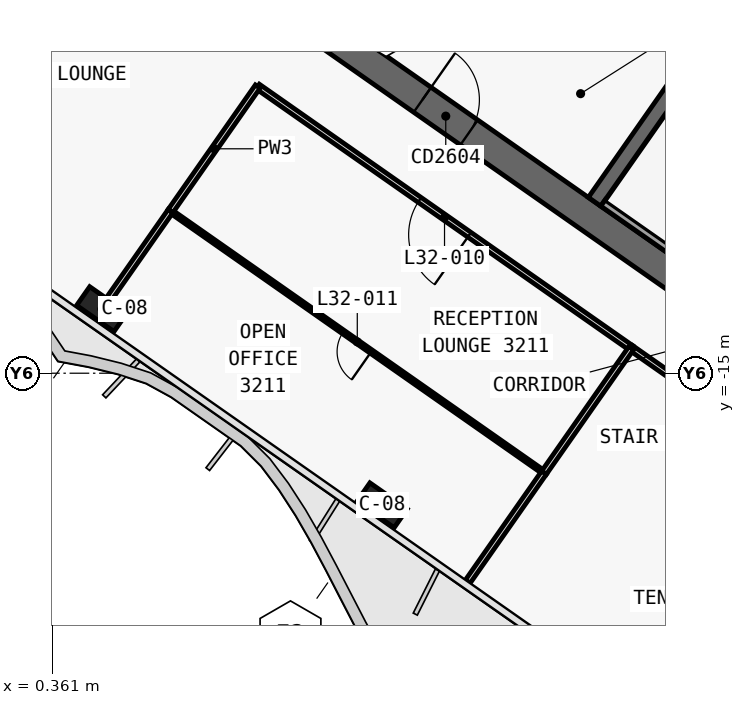
"""IFC4 building model, lengths in metres.
Left out: names, types, materials, properties, quantities, classifications, styles, units other than length and angle.
Written with IfcOpenShell. Run it as: python <this file> out.ifc"""

import sys

from ifc_helpers import new_model, si_unit, direction, frame, frame_2d, origin, origin_2d, place, context, subcontext, project, spatial, polyline, rectangle, outline, extrude, element, fill, save


model = new_model("IFC4")
c1 = context("Model", 3, precision=1e-05, world=origin(), true_north=direction((0.0, 1.0)))
c2 = subcontext(c1, "Body", "Model", "MODEL_VIEW")
j1 = project(units=[si_unit("LENGTHUNIT", "METRE"), si_unit("PLANEANGLEUNIT", "RADIAN")], contexts=[c1])
p1 = place(None, origin())
s1 = spatial("IfcSite", under=j1, at=p1, CompositionType="ELEMENT")
p2 = place(p1, origin())
s2 = spatial("IfcBuilding", under=s1, at=p2, CompositionType="ELEMENT")
p3 = place(p2, frame((0.0, 0.0, 143.7)))
s3 = spatial("IfcBuildingStorey", under=s2, at=p3, CompositionType="ELEMENT", Elevation=143.7)
p4 = place(p3, frame((-0.029, 11.984, 0.0), z_axis=(0.0, 0.0, 1.0), x_axis=(0.819151382952, -0.573577380837, 0.0)))
e1 = element("IfcWall", 1, at=p4, inside=s3, PredefinedType="SHEAR", context=c2, shape_type="SweptSolid", body=[
    extrude(outline(polyline([(33.898, 0.4), (-0.0, 0.4), (0.56, -0.4), (33.898, -0.4), (33.898, 0.4)])), origin(), (0.0, 0.0, 1.0), 3.9),
])
p5 = place(p3, frame((-0.029, -0.712, 0.0), z_axis=(0.0, 0.0, 1.0), x_axis=(0.819151758019, -0.573576845187, 0.0)))
e2 = element("IfcWall", 2, at=p5, inside=s3, PredefinedType="SHEAR", context=c2, shape_type="SweptSolid", body=[
    extrude(outline(polyline([(26.616, 0.4), (-0.0, 0.4), (0.56, -0.4), (26.616, -0.4), (26.616, 0.4)])), origin(), (0.0, 0.0, 1.0), 3.9),
])
p6 = place(p5, frame((6.666, 0.0, 0.0)))
e3 = element("IfcOpeningElement", 3, at=p6, cuts=e2, PredefinedType="OPENING", context=c2, shape_type="SweptSolid", body=[
    extrude(rectangle(XDim=1.5, YDim=2.1, at=frame_2d((0.75, 1.05))), frame((0.0, 0.41, 0.0), z_axis=(0.0, -1.0, 0.0), x_axis=(1.0, 0.0, 0.0)), (0.0, 0.0, 1.0), 0.82),
])
p7 = place(p5, frame((12.366, 0.0, 0.0)))
e4 = element("IfcOpeningElement", 4, at=p7, cuts=e2, PredefinedType="OPENING", context=c2, shape_type="SweptSolid", body=[
    extrude(rectangle(XDim=1.5, YDim=2.1, at=frame_2d((0.75, 1.05))), frame((0.0, 0.41, 0.0), z_axis=(0.0, -1.0, 0.0), x_axis=(1.0, 0.0, 0.0)), (0.0, 0.0, 1.0), 0.82),
])
p8 = place(p3, frame((14.63, -10.488, 0.0), z_axis=(0.0, 0.0, 1.0), x_axis=(0.573611936273, 0.819127185829, 0.0)))
e5 = element("IfcWall", 5, at=p8, inside=s3, PredefinedType="SHEAR", context=c2, shape_type="SweptSolid", body=[
    extrude(outline(polyline([(0.0, 0.2), (0.0, -0.2), (4.6, -0.2), (4.6, 0.2), (0.0, 0.2)])), origin(), (0.0, 0.0, 1.0), 3.9),
])
p9 = place(p3, frame((2.638, 3.768, 0.0), z_axis=(0.0, 0.0, 1.0), x_axis=(0.81915267502, -0.573575535572, 0.0)))
e6 = element("IfcWall", 6, at=p9, inside=s3, PredefinedType="SHEAR", context=c2, shape_type="SweptSolid", body=[
    extrude(outline(polyline([(0.0, 0.2), (0.0, -0.2), (26.2, -0.2), (26.2, 0.2), (0.0, 0.2)])), origin(), (0.0, 0.0, 1.0), 3.9),
])
p10 = place(p9, frame((9.637, 0.0, 0.0)))
e7 = element("IfcOpeningElement", 7, at=p10, cuts=e6, PredefinedType="OPENING", context=c2, shape_type="SweptSolid", body=[
    extrude(rectangle(XDim=1.2, YDim=2.1, at=frame_2d((0.6, 1.05))), frame((0.0, 0.21, 0.0), z_axis=(0.0, -1.0, 0.0), x_axis=(1.0, 0.0, 0.0)), (0.0, 0.0, 1.0), 0.42),
])
p11 = place(p9, frame((11.812, 0.0, 0.0)))
e8 = element("IfcOpeningElement", 8, at=p11, cuts=e6, PredefinedType="OPENING", context=c2, shape_type="SweptSolid", body=[
    extrude(rectangle(XDim=1.2, YDim=2.1, at=frame_2d((0.6, 1.05))), frame((0.0, 0.21, 0.0), z_axis=(0.0, -1.0, 0.0), x_axis=(1.0, 0.0, 0.0)), (0.0, 0.0, 1.0), 0.42),
])
p12 = place(p9, frame((13.988, 0.0, 0.0)))
e9 = element("IfcOpeningElement", 9, at=p12, cuts=e6, PredefinedType="OPENING", context=c2, shape_type="SweptSolid", body=[
    extrude(rectangle(XDim=1.2, YDim=2.1, at=frame_2d((0.6, 1.05))), frame((0.0, 0.21, 0.0), z_axis=(0.0, -1.0, 0.0), x_axis=(1.0, 0.0, 0.0)), (0.0, 0.0, 1.0), 0.42),
])
p13 = place(p9, frame((16.262, 0.0, 0.0)))
e10 = element("IfcOpeningElement", 10, at=p13, cuts=e6, PredefinedType="OPENING", context=c2, shape_type="SweptSolid", body=[
    extrude(rectangle(XDim=1.0, YDim=2.1, at=frame_2d((0.5, 1.05))), frame((0.0, 0.21, 0.0), z_axis=(0.0, -1.0, 0.0), x_axis=(1.0, 0.0, 0.0)), (0.0, 0.0, 1.0), 0.42),
])
for number, where, z_axis, x_axis in (
    (11, (1.665, -13.313, 0.0), (0.0, 0.0, 1.0), (0.819, -0.574, 0.0)),
    (12, (9.038, -18.475, 0.0), (0.0, 0.0, 1.0), (0.819, -0.574, 0.0)),
):
    element("IfcColumn", number, at=place(p3, frame(where, z_axis=z_axis, x_axis=x_axis)), inside=s3, PredefinedType="COLUMN", context=c2, shape_type="SweptSolid", body=[
        extrude(rectangle(XDim=1.2, YDim=0.6, at=origin_2d()), origin(), (0.0, 0.0, 1.0), 3.9),
    ])
p14 = place(p3, frame((14.851, -10.521, 0.0), z_axis=(0.0, 0.0, 1.0), x_axis=(0.819141584393, -0.57359137434, 0.0)))
e13 = element("IfcWall", 13, at=p14, inside=s3, PredefinedType="SOLIDWALL", context=c2, shape_type="SweptSolid", body=[
    extrude(rectangle(XDim=8.0, YDim=0.2, at=frame_2d((4.0, 0.0))), origin(), (0.0, 0.0, 1.0), 3.62),
])
p15 = place(p3, frame((15.598, -14.34, 0.0), z_axis=(0.0, 0.0, 1.0), x_axis=(-0.81915546166, 0.573571555809, 0.0)))
e14 = element("IfcWall", 14, at=p15, inside=s3, PredefinedType="PARTITIONING", context=c2, shape_type="SweptSolid", body=[
    extrude(rectangle(XDim=12.002, YDim=0.15, at=frame_2d((6.001, 0.0))), origin(), (0.0, 0.0, 1.0), 3.0),
])
p16 = place(p15, frame((5.201, 0.0, 0.0)))
e15 = element("IfcOpeningElement", 15, at=p16, cuts=e14, PredefinedType="OPENING", context=c2, shape_type="SweptSolid", body=[
    extrude(rectangle(XDim=1.6, YDim=2.1, at=frame_2d((0.8, 1.05))), frame((0.0, 0.085, 0.0), z_axis=(0.0, -1.0, 0.0), x_axis=(1.0, 0.0, 0.0)), (0.0, 0.0, 1.0), 0.17),
])
p17 = place(p3, frame((25.427, -21.223, 0.0), z_axis=(0.0, 0.0, 1.0), x_axis=(-0.819147828287, 0.573582457378, 0.0)))
e16 = element("IfcWall", 16, at=p17, inside=s3, PredefinedType="PARTITIONING", context=c2, shape_type="SweptSolid", body=[
    extrude(rectangle(XDim=12.004, YDim=0.15, at=frame_2d((6.002, 0.0))), origin(), (0.0, 0.0, 1.0), 3.0),
])
p18 = place(p17, frame((5.202, 0.0, 0.0)))
e17 = element("IfcOpeningElement", 17, at=p18, cuts=e16, PredefinedType="OPENING", context=c2, shape_type="SweptSolid", body=[
    extrude(rectangle(XDim=1.6, YDim=2.1, at=frame_2d((0.8, 1.05))), frame((0.0, 0.085, 0.0), z_axis=(0.0, -1.0, 0.0), x_axis=(1.0, 0.0, 0.0)), (0.0, 0.0, 1.0), 0.17),
])
p19 = place(p3, frame((13.301, -17.616, 0.0), z_axis=(0.0, 0.0, 1.0), x_axis=(-0.819146845232, 0.573583861302, 0.0)))
e18 = element("IfcWall", 18, at=p19, inside=s3, PredefinedType="PARTITIONING", context=c2, shape_type="SweptSolid", body=[
    extrude(rectangle(XDim=12.0, YDim=0.1, at=frame_2d((6.0, 0.0))), origin(), (0.0, 0.0, 1.0), 3.0),
])
p20 = place(p19, frame((5.55, 0.0, 0.0)))
e19 = element("IfcOpeningElement", 19, at=p20, cuts=e18, PredefinedType="OPENING", context=c2, shape_type="SweptSolid", body=[
    extrude(rectangle(XDim=0.9, YDim=2.1, at=frame_2d((0.45, 1.05))), frame((0.0, 0.06, 0.0), z_axis=(0.0, -1.0, 0.0), x_axis=(1.0, 0.0, 0.0)), (0.0, 0.0, 1.0), 0.12),
])
p21 = place(p3, frame((13.301, -17.616, 0.0), z_axis=(0.0, 0.0, 1.0), x_axis=(-0.573555999232, -0.819166354134, 0.0)))
e20 = element("IfcWall", 20, at=p21, inside=s3, PredefinedType="PARTITIONING", context=c2, shape_type="SweptSolid", body=[
    extrude(rectangle(XDim=3.499, YDim=0.15, at=frame_2d((1.75, 0.0))), origin(), (0.0, 0.0, 1.0), 2.9),
])
p22 = place(p3, frame((1.849, -13.051, 0.0), z_axis=(0.0, 0.0, 1.0), x_axis=(0.573555012677, 0.819167044889, 0.0)))
e21 = element("IfcWall", 21, at=p22, inside=s3, PredefinedType="PARTITIONING", context=c2, shape_type="SweptSolid", body=[
    extrude(rectangle(XDim=2.829, YDim=0.15, at=frame_2d((1.415, 0.0))), origin(), (0.0, 0.0, 1.0), 3.0),
])
p23 = place(p3, frame((15.596, -14.339, 0.0), z_axis=(0.0, 0.0, 1.0), x_axis=(-0.573556557423, -0.819165963305, 0.0)))
e22 = element("IfcWall", 22, at=p23, inside=s3, PredefinedType="PARTITIONING", context=c2, shape_type="SweptSolid", body=[
    extrude(rectangle(XDim=4.0, YDim=0.15, at=frame_2d((2.0, 0.0))), origin(), (0.0, 0.0, 1.0), 3.62),
])
p24 = place(p3, frame((3.472, -10.732, 0.0), z_axis=(0.0, 0.0, 1.0), x_axis=(0.573597512525, 0.819137286189, 0.0)))
e23 = element("IfcWall", 23, at=p24, inside=s3, PredefinedType="PARTITIONING", context=c2, shape_type="SweptSolid", body=[
    extrude(rectangle(XDim=4.0, YDim=0.15, at=frame_2d((2.0, 0.0))), origin(), (0.0, 0.0, 1.0), 3.0),
])
p25 = place(p7, origin())
e24 = element("IfcDoor", 24, at=p25, inside=s3, OperationType="DOUBLE_DOOR_SINGLE_SWING", PredefinedType="DOOR", context=c2, shape_type="SweptSolid", body=[
    extrude(rectangle(XDim=1.5, YDim=2.1, at=frame_2d((0.75, 1.05))), frame((0.0, 0.025, 0.0), z_axis=(0.0, -1.0, 0.0), x_axis=(1.0, 0.0, 0.0)), (0.0, 0.0, 1.0), 0.05),
])
fill(e4, e24)
p26 = place(p16, origin())
e25 = element("IfcDoor", 25, at=p26, inside=s3, OperationType="DOUBLE_DOOR_SINGLE_SWING", PredefinedType="DOOR", context=c2, shape_type="SweptSolid", body=[
    extrude(rectangle(XDim=1.6, YDim=2.1, at=frame_2d((0.8, 1.05))), frame((0.0, 0.025, 0.0), z_axis=(0.0, -1.0, 0.0), x_axis=(1.0, 0.0, 0.0)), (0.0, 0.0, 1.0), 0.05),
])
fill(e15, e25)
p27 = place(p20, origin())
e26 = element("IfcDoor", 26, at=p27, inside=s3, OperationType="SINGLE_SWING_LEFT", PredefinedType="DOOR", context=c2, shape_type="SweptSolid", body=[
    extrude(rectangle(XDim=0.9, YDim=2.1, at=frame_2d((0.45, 1.05))), frame((0.0, 0.025, 0.0), z_axis=(0.0, -1.0, 0.0), x_axis=(1.0, 0.0, 0.0)), (0.0, 0.0, 1.0), 0.05),
])
fill(e19, e26)
save(model, sys.argv[1])
